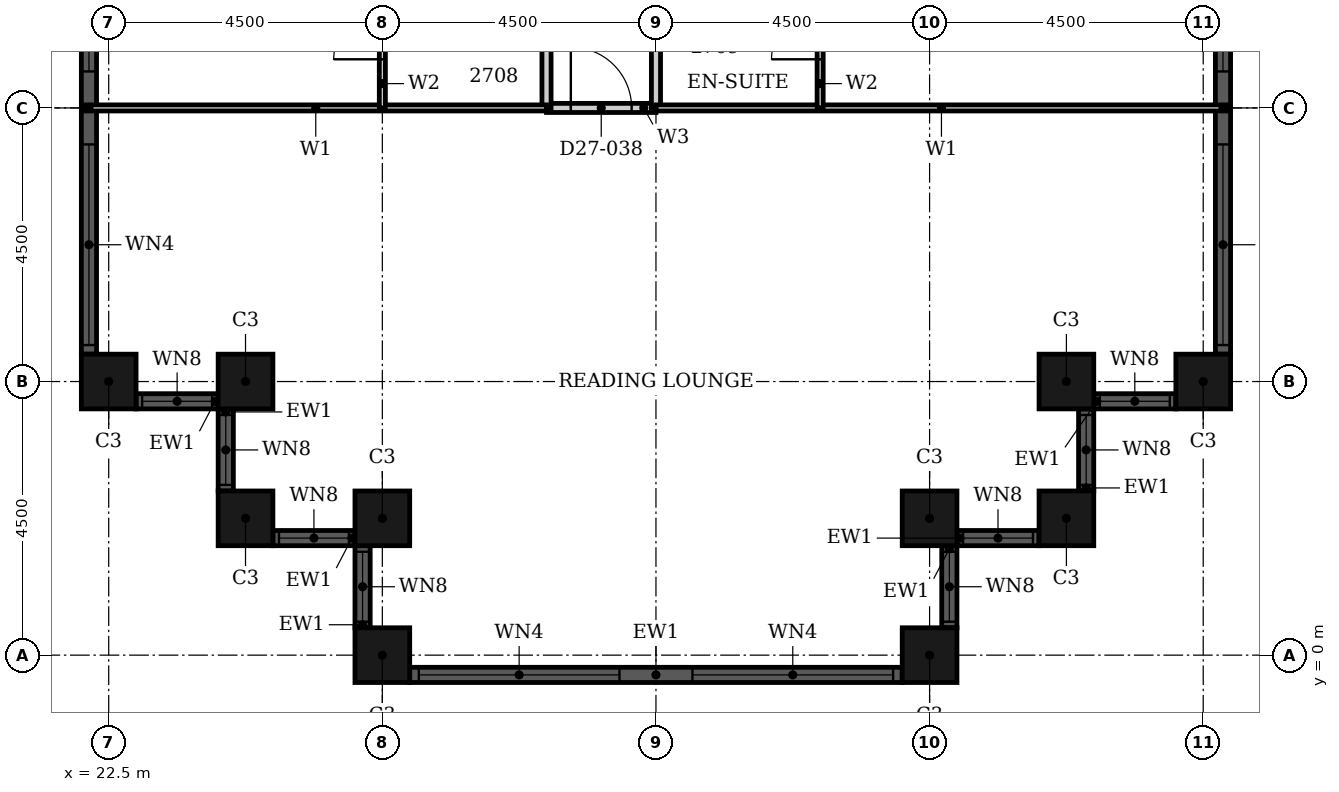
"""IFC4 building model, lengths in metres.
Left out: names, types, materials, properties, quantities, classifications, styles, units other than length and angle.
Written with IfcOpenShell. Run it as: python <this file> out.ifc"""

import sys

from ifc_helpers import new_model, si_unit, direction, frame, frame_2d, origin, origin_2d, place, context, subcontext, project, spatial, rectangle, hollow_rectangle, extrude, element, fill, save


model = new_model("IFC4")
c1 = context("Model", 3, precision=1e-05, world=origin(), true_north=direction((0.0, 1.0)))
c2 = subcontext(c1, "Body", "Model", "MODEL_VIEW")
j1 = project(units=[si_unit("LENGTHUNIT", "METRE"), si_unit("PLANEANGLEUNIT", "RADIAN")], contexts=[c1])
p1 = place(None, origin())
s1 = spatial("IfcSite", under=j1, at=p1, CompositionType="ELEMENT")
p2 = place(p1, origin())
s2 = spatial("IfcBuilding", under=s1, at=p2, CompositionType="ELEMENT")
p3 = place(p2, frame((0.0, 0.0, 111.6)))
s3 = spatial("IfcBuildingStorey", under=s2, at=p3, CompositionType="ELEMENT", Elevation=111.6)
for number, where, z_axis, x_axis in (
    (1, (22.5, 4.5, 0.0), (0.0, 0.0, 1.0), (1.0, 0.0, 0.0)),
    (2, (24.75, 4.5, 0.0), (0.0, 0.0, 1.0), (1.0, 0.0, 0.0)),
    (3, (24.75, 2.25, 0.0), (0.0, 0.0, 1.0), (1.0, 0.0, 0.0)),
    (4, (27.0, 2.25, 0.0), (0.0, 0.0, 1.0), (1.0, 0.0, 0.0)),
    (5, (27.0, 0.0, 0.0), (0.0, 0.0, 1.0), (1.0, 0.0, 0.0)),
    (6, (36.0, 0.0, 0.0), (0.0, 0.0, 1.0), (1.0, 0.0, 0.0)),
    (7, (36.0, 2.25, 0.0), (0.0, 0.0, 1.0), (1.0, 0.0, 0.0)),
    (8, (38.25, 2.25, 0.0), (0.0, 0.0, 1.0), (1.0, 0.0, 0.0)),
    (9, (38.25, 4.5, 0.0), (0.0, 0.0, 1.0), (1.0, 0.0, 0.0)),
    (10, (40.5, 4.5, 0.0), (0.0, 0.0, 1.0), (1.0, 0.0, 0.0)),
):
    element("IfcColumn", number, at=place(p3, frame(where, z_axis=z_axis, x_axis=x_axis)), inside=s3, PredefinedType="COLUMN", context=c2, shape_type="SweptSolid", body=[
        extrude(hollow_rectangle(XDim=0.9, YDim=0.9, WallThickness=0.028, at=origin_2d()), origin(), (0.0, 0.0, 1.0), 3.6),
    ])
p4 = place(p3, frame((22.95, 4.175, 0.0), z_axis=(0.0, 0.0, 1.0), x_axis=(1.0, 0.0, 0.0)))
e11 = element("IfcWall", 11, at=p4, inside=s3, PredefinedType="SOLIDWALL", context=c2, shape_type="SweptSolid", body=[
    extrude(rectangle(XDim=1.35, YDim=0.25, at=frame_2d((0.675, 0.0))), origin(), (0.0, 0.0, 1.0), 3.6),
])
p5 = place(p4, frame((0.1, 0.0, 0.9)))
e12 = element("IfcOpeningElement", 12, at=p5, cuts=e11, PredefinedType="OPENING", context=c2, shape_type="SweptSolid", body=[
    extrude(rectangle(XDim=1.15, YDim=2.08, at=frame_2d((0.575, 1.04))), frame((0.0, 0.135, 0.0), z_axis=(0.0, -1.0, 0.0), x_axis=(1.0, 0.0, 0.0)), (0.0, 0.0, 1.0), 0.27),
])
p6 = place(p3, frame((24.425, 4.05, 0.0), z_axis=(0.0, 0.0, 1.0), x_axis=(0.0, -1.0, 0.0)))
e13 = element("IfcWall", 13, at=p6, inside=s3, PredefinedType="SOLIDWALL", context=c2, shape_type="SweptSolid", body=[
    extrude(rectangle(XDim=1.35, YDim=0.25, at=frame_2d((0.675, 0.0))), origin(), (0.0, 0.0, 1.0), 3.6),
])
p7 = place(p6, frame((0.1, 0.0, 0.9)))
e14 = element("IfcOpeningElement", 14, at=p7, cuts=e13, PredefinedType="OPENING", context=c2, shape_type="SweptSolid", body=[
    extrude(rectangle(XDim=1.15, YDim=2.08, at=frame_2d((0.575, 1.04))), frame((0.0, 0.135, 0.0), z_axis=(0.0, -1.0, 0.0), x_axis=(1.0, 0.0, 0.0)), (0.0, 0.0, 1.0), 0.27),
])
p8 = place(p3, frame((25.2, 1.925, 0.0), z_axis=(0.0, 0.0, 1.0), x_axis=(1.0, 0.0, 0.0)))
e15 = element("IfcWall", 15, at=p8, inside=s3, PredefinedType="SOLIDWALL", context=c2, shape_type="SweptSolid", body=[
    extrude(rectangle(XDim=1.35, YDim=0.25, at=frame_2d((0.675, 0.0))), origin(), (0.0, 0.0, 1.0), 3.6),
])
p9 = place(p8, frame((0.1, 0.0, 0.9)))
e16 = element("IfcOpeningElement", 16, at=p9, cuts=e15, PredefinedType="OPENING", context=c2, shape_type="SweptSolid", body=[
    extrude(rectangle(XDim=1.15, YDim=2.08, at=frame_2d((0.575, 1.04))), frame((0.0, 0.135, 0.0), z_axis=(0.0, -1.0, 0.0), x_axis=(1.0, 0.0, 0.0)), (0.0, 0.0, 1.0), 0.27),
])
p10 = place(p3, frame((26.675, 1.8, 0.0), z_axis=(0.0, 0.0, 1.0), x_axis=(0.0, -1.0, 0.0)))
e17 = element("IfcWall", 17, at=p10, inside=s3, PredefinedType="SOLIDWALL", context=c2, shape_type="SweptSolid", body=[
    extrude(rectangle(XDim=1.35, YDim=0.25, at=frame_2d((0.675, 0.0))), origin(), (0.0, 0.0, 1.0), 3.6),
])
p11 = place(p10, frame((0.1, 0.0, 0.9)))
e18 = element("IfcOpeningElement", 18, at=p11, cuts=e17, PredefinedType="OPENING", context=c2, shape_type="SweptSolid", body=[
    extrude(rectangle(XDim=1.15, YDim=2.08, at=frame_2d((0.575, 1.04))), frame((0.0, 0.135, 0.0), z_axis=(0.0, -1.0, 0.0), x_axis=(1.0, 0.0, 0.0)), (0.0, 0.0, 1.0), 0.27),
])
p12 = place(p3, frame((27.45, -0.325, 0.0), z_axis=(0.0, 0.0, 1.0), x_axis=(1.0, 0.0, 0.0)))
e19 = element("IfcWall", 19, at=p12, inside=s3, PredefinedType="SOLIDWALL", context=c2, shape_type="SweptSolid", body=[
    extrude(rectangle(XDim=8.1, YDim=0.25, at=frame_2d((4.05, 0.0))), origin(), (0.0, 0.0, 1.0), 3.6),
])
p13 = place(p12, frame((0.15, 0.0, 0.9)))
e20 = element("IfcOpeningElement", 20, at=p13, cuts=e19, PredefinedType="OPENING", context=c2, shape_type="SweptSolid", body=[
    extrude(rectangle(XDim=3.3, YDim=2.08, at=frame_2d((1.65, 1.04))), frame((0.0, 0.135, 0.0), z_axis=(0.0, -1.0, 0.0), x_axis=(1.0, 0.0, 0.0)), (0.0, 0.0, 1.0), 0.27),
])
p14 = place(p12, frame((4.65, 0.0, 0.9)))
e21 = element("IfcOpeningElement", 21, at=p14, cuts=e19, PredefinedType="OPENING", context=c2, shape_type="SweptSolid", body=[
    extrude(rectangle(XDim=3.3, YDim=2.08, at=frame_2d((1.65, 1.04))), frame((0.0, 0.135, 0.0), z_axis=(0.0, -1.0, 0.0), x_axis=(1.0, 0.0, 0.0)), (0.0, 0.0, 1.0), 0.27),
])
p15 = place(p3, frame((36.325, 0.45, 0.0), z_axis=(0.0, 0.0, 1.0), x_axis=(0.0, 1.0, 0.0)))
e22 = element("IfcWall", 22, at=p15, inside=s3, PredefinedType="SOLIDWALL", context=c2, shape_type="SweptSolid", body=[
    extrude(rectangle(XDim=1.35, YDim=0.25, at=frame_2d((0.675, 0.0))), origin(), (0.0, 0.0, 1.0), 3.6),
])
p16 = place(p15, frame((0.1, 0.0, 0.9)))
e23 = element("IfcOpeningElement", 23, at=p16, cuts=e22, PredefinedType="OPENING", context=c2, shape_type="SweptSolid", body=[
    extrude(rectangle(XDim=1.15, YDim=2.08, at=frame_2d((0.575, 1.04))), frame((0.0, 0.135, 0.0), z_axis=(0.0, -1.0, 0.0), x_axis=(1.0, 0.0, 0.0)), (0.0, 0.0, 1.0), 0.27),
])
p17 = place(p3, frame((36.45, 1.925, 0.0), z_axis=(0.0, 0.0, 1.0), x_axis=(1.0, 0.0, 0.0)))
e24 = element("IfcWall", 24, at=p17, inside=s3, PredefinedType="SOLIDWALL", context=c2, shape_type="SweptSolid", body=[
    extrude(rectangle(XDim=1.35, YDim=0.25, at=frame_2d((0.675, 0.0))), origin(), (0.0, 0.0, 1.0), 3.6),
])
p18 = place(p17, frame((0.1, 0.0, 0.9)))
e25 = element("IfcOpeningElement", 25, at=p18, cuts=e24, PredefinedType="OPENING", context=c2, shape_type="SweptSolid", body=[
    extrude(rectangle(XDim=1.15, YDim=2.08, at=frame_2d((0.575, 1.04))), frame((0.0, 0.135, 0.0), z_axis=(0.0, -1.0, 0.0), x_axis=(1.0, 0.0, 0.0)), (0.0, 0.0, 1.0), 0.27),
])
p19 = place(p3, frame((38.575, 2.7, 0.0), z_axis=(0.0, 0.0, 1.0), x_axis=(0.0, 1.0, 0.0)))
e26 = element("IfcWall", 26, at=p19, inside=s3, PredefinedType="SOLIDWALL", context=c2, shape_type="SweptSolid", body=[
    extrude(rectangle(XDim=1.35, YDim=0.25, at=frame_2d((0.675, 0.0))), origin(), (0.0, 0.0, 1.0), 3.6),
])
p20 = place(p19, frame((0.1, 0.0, 0.9)))
e27 = element("IfcOpeningElement", 27, at=p20, cuts=e26, PredefinedType="OPENING", context=c2, shape_type="SweptSolid", body=[
    extrude(rectangle(XDim=1.15, YDim=2.08, at=frame_2d((0.575, 1.04))), frame((0.0, 0.135, 0.0), z_axis=(0.0, -1.0, 0.0), x_axis=(1.0, 0.0, 0.0)), (0.0, 0.0, 1.0), 0.27),
])
p21 = place(p3, frame((38.7, 4.175, 0.0), z_axis=(0.0, 0.0, 1.0), x_axis=(1.0, 0.0, 0.0)))
e28 = element("IfcWall", 28, at=p21, inside=s3, PredefinedType="SOLIDWALL", context=c2, shape_type="SweptSolid", body=[
    extrude(rectangle(XDim=1.35, YDim=0.25, at=frame_2d((0.675, 0.0))), origin(), (0.0, 0.0, 1.0), 3.6),
])
p22 = place(p21, frame((0.1, 0.0, 0.9)))
e29 = element("IfcOpeningElement", 29, at=p22, cuts=e28, PredefinedType="OPENING", context=c2, shape_type="SweptSolid", body=[
    extrude(rectangle(XDim=1.15, YDim=2.08, at=frame_2d((0.575, 1.04))), frame((0.0, 0.135, 0.0), z_axis=(0.0, -1.0, 0.0), x_axis=(1.0, 0.0, 0.0)), (0.0, 0.0, 1.0), 0.27),
])
p23 = place(p3, frame((40.825, 4.95, 0.0), z_axis=(0.0, 0.0, 1.0), x_axis=(0.0, 1.0, 0.0)))
e30 = element("IfcWall", 30, at=p23, inside=s3, PredefinedType="SOLIDWALL", context=c2, shape_type="SweptSolid", body=[
    extrude(rectangle(XDim=8.1, YDim=0.25, at=frame_2d((4.05, 0.0))), origin(), (0.0, 0.0, 1.0), 3.6),
])
p24 = place(p23, frame((0.15, 0.0, 0.9)))
e31 = element("IfcOpeningElement", 31, at=p24, cuts=e30, PredefinedType="OPENING", context=c2, shape_type="SweptSolid", body=[
    extrude(rectangle(XDim=3.3, YDim=2.08, at=frame_2d((1.65, 1.04))), frame((0.0, 0.135, 0.0), z_axis=(0.0, -1.0, 0.0), x_axis=(1.0, 0.0, 0.0)), (0.0, 0.0, 1.0), 0.27),
])
p25 = place(p23, frame((4.65, 0.0, 0.9)))
e32 = element("IfcOpeningElement", 32, at=p25, cuts=e30, PredefinedType="OPENING", context=c2, shape_type="SweptSolid", body=[
    extrude(rectangle(XDim=3.3, YDim=2.08, at=frame_2d((1.65, 1.04))), frame((0.0, 0.135, 0.0), z_axis=(0.0, -1.0, 0.0), x_axis=(1.0, 0.0, 0.0)), (0.0, 0.0, 1.0), 0.27),
])
p26 = place(p3, frame((22.175, 13.05, 0.0), z_axis=(0.0, 0.0, 1.0), x_axis=(0.0, -1.0, 0.0)))
e33 = element("IfcWall", 33, at=p26, inside=s3, PredefinedType="SOLIDWALL", context=c2, shape_type="SweptSolid", body=[
    extrude(rectangle(XDim=8.1, YDim=0.25, at=frame_2d((4.05, 0.0))), origin(), (0.0, 0.0, 1.0), 3.6),
])
p27 = place(p26, frame((0.15, 0.0, 0.9)))
e34 = element("IfcOpeningElement", 34, at=p27, cuts=e33, PredefinedType="OPENING", context=c2, shape_type="SweptSolid", body=[
    extrude(rectangle(XDim=3.3, YDim=2.08, at=frame_2d((1.65, 1.04))), frame((0.0, 0.135, 0.0), z_axis=(0.0, -1.0, 0.0), x_axis=(1.0, 0.0, 0.0)), (0.0, 0.0, 1.0), 0.27),
])
p28 = place(p26, frame((4.65, 0.0, 0.9)))
e35 = element("IfcOpeningElement", 35, at=p28, cuts=e33, PredefinedType="OPENING", context=c2, shape_type="SweptSolid", body=[
    extrude(rectangle(XDim=3.3, YDim=2.08, at=frame_2d((1.65, 1.04))), frame((0.0, 0.135, 0.0), z_axis=(0.0, -1.0, 0.0), x_axis=(1.0, 0.0, 0.0)), (0.0, 0.0, 1.0), 0.27),
])
p29 = place(p3, frame((29.7, 9.0, 0.0), z_axis=(0.0, 0.0, 1.0), x_axis=(1.0, 0.0, 0.0)))
e36 = element("IfcWall", 36, at=p29, inside=s3, PredefinedType="PARTITIONING", context=c2, shape_type="SweptSolid", body=[
    extrude(rectangle(XDim=1.8, YDim=0.15, at=frame_2d((0.9, 0.0))), origin(), (0.0, 0.0, 1.0), 3.3),
])
p30 = place(p29, frame((0.4, 0.0, 0.0)))
e37 = element("IfcOpeningElement", 37, at=p30, cuts=e36, PredefinedType="OPENING", context=c2, shape_type="SweptSolid", body=[
    extrude(rectangle(XDim=1.0, YDim=2.1, at=frame_2d((0.5, 1.05))), frame((0.0, 0.085, 0.0), z_axis=(0.0, -1.0, 0.0), x_axis=(1.0, 0.0, 0.0)), (0.0, 0.0, 1.0), 0.17),
])
p31 = place(p3, frame((29.7, 9.0, 0.0), z_axis=(0.0, 0.0, 1.0), x_axis=(0.0, 1.0, 0.0)))
e38 = element("IfcWall", 38, at=p31, inside=s3, PredefinedType="PARTITIONING", context=c2, shape_type="SweptSolid", body=[
    extrude(rectangle(XDim=11.7, YDim=0.15, at=frame_2d((5.85, 0.0))), origin(), (0.0, 0.0, 1.0), 3.3),
])
p32 = place(p31, frame((2.95, 0.0, 0.0)))
e39 = element("IfcOpeningElement", 39, at=p32, cuts=e38, PredefinedType="OPENING", context=c2, shape_type="SweptSolid", body=[
    extrude(rectangle(XDim=1.0, YDim=2.1, at=frame_2d((0.5, 1.05))), frame((0.0, 0.085, 0.0), z_axis=(0.0, -1.0, 0.0), x_axis=(1.0, 0.0, 0.0)), (0.0, 0.0, 1.0), 0.17),
])
p33 = place(p3, frame((31.5, 9.0, 0.0), z_axis=(0.0, 0.0, 1.0), x_axis=(0.0, 1.0, 0.0)))
e40 = element("IfcWall", 40, at=p33, inside=s3, PredefinedType="PARTITIONING", context=c2, shape_type="SweptSolid", body=[
    extrude(rectangle(XDim=11.7, YDim=0.15, at=frame_2d((5.85, 0.0))), origin(), (0.0, 0.0, 1.0), 2.58),
])
p34 = place(p33, frame((2.95, 0.0, 0.0)))
e41 = element("IfcOpeningElement", 41, at=p34, cuts=e40, PredefinedType="OPENING", context=c2, shape_type="SweptSolid", body=[
    extrude(rectangle(XDim=1.0, YDim=2.1, at=frame_2d((0.5, 1.05))), frame((0.0, 0.085, 0.0), z_axis=(0.0, -1.0, 0.0), x_axis=(1.0, 0.0, 0.0)), (0.0, 0.0, 1.0), 0.17),
])
p35 = place(p3, frame((31.5, 9.0, 0.0), z_axis=(0.0, 0.0, 1.0), x_axis=(1.0, 0.0, 0.0)))
e42 = element("IfcWall", 42, at=p35, inside=s3, PredefinedType="PARTITIONING", context=c2, shape_type="SweptSolid", body=[
    extrude(rectangle(XDim=9.39, YDim=0.1, at=frame_2d((4.695, 0.0))), origin(), (0.0, 0.0, 1.0), 3.3),
])
p36 = place(p3, frame((22.11, 9.0, 0.0), z_axis=(0.0, 0.0, 1.0), x_axis=(1.0, 0.0, 0.0)))
e43 = element("IfcWall", 43, at=p36, inside=s3, PredefinedType="PARTITIONING", context=c2, shape_type="SweptSolid", body=[
    extrude(rectangle(XDim=7.59, YDim=0.1, at=frame_2d((3.795, 0.0))), origin(), (0.0, 0.0, 1.0), 3.3),
])
p37 = place(p3, frame((27.0, 9.0, 0.0), z_axis=(0.0, 0.0, 1.0), x_axis=(0.0, 1.0, 0.0)))
e44 = element("IfcWall", 44, at=p37, inside=s3, PredefinedType="PARTITIONING", context=c2, shape_type="SweptSolid", body=[
    extrude(rectangle(XDim=2.4, YDim=0.1, at=frame_2d((1.2, 0.0))), origin(), (0.0, 0.0, 1.0), 2.58),
])
p38 = place(p37, frame((0.8, 0.0, 0.0)))
e45 = element("IfcOpeningElement", 45, at=p38, cuts=e44, PredefinedType="OPENING", context=c2, shape_type="SweptSolid", body=[
    extrude(rectangle(XDim=0.8, YDim=2.1, at=frame_2d((0.4, 1.05))), frame((0.0, 0.06, 0.0), z_axis=(0.0, -1.0, 0.0), x_axis=(1.0, 0.0, 0.0)), (0.0, 0.0, 1.0), 0.12),
])
p39 = place(p3, frame((34.2, 9.0, 0.0), z_axis=(0.0, 0.0, 1.0), x_axis=(0.0, 1.0, 0.0)))
e46 = element("IfcWall", 46, at=p39, inside=s3, PredefinedType="PARTITIONING", context=c2, shape_type="SweptSolid", body=[
    extrude(rectangle(XDim=2.4, YDim=0.1, at=frame_2d((1.2, 0.0))), origin(), (0.0, 0.0, 1.0), 3.3),
])
p40 = place(p39, frame((0.8, 0.0, 0.0)))
e47 = element("IfcOpeningElement", 47, at=p40, cuts=e46, PredefinedType="OPENING", context=c2, shape_type="SweptSolid", body=[
    extrude(rectangle(XDim=0.8, YDim=2.1, at=frame_2d((0.4, 1.05))), frame((0.0, 0.06, 0.0), z_axis=(0.0, -1.0, 0.0), x_axis=(1.0, 0.0, 0.0)), (0.0, 0.0, 1.0), 0.12),
])
p41 = place(p5, origin())
e48 = element("IfcWindow", 48, at=p41, inside=s3, PartitioningType="SINGLE_PANEL", PredefinedType="WINDOW", context=c2, shape_type="SweptSolid", body=[
    extrude(rectangle(XDim=1.15, YDim=2.08, at=frame_2d((0.575, 1.04))), frame((0.0, 0.03, 0.0), z_axis=(0.0, -1.0, 0.0), x_axis=(1.0, 0.0, 0.0)), (0.0, 0.0, 1.0), 0.06),
])
fill(e12, e48)
p42 = place(p7, origin())
e49 = element("IfcWindow", 49, at=p42, inside=s3, PartitioningType="SINGLE_PANEL", PredefinedType="WINDOW", context=c2, shape_type="SweptSolid", body=[
    extrude(rectangle(XDim=1.15, YDim=2.08, at=frame_2d((0.575, 1.04))), frame((0.0, 0.03, 0.0), z_axis=(0.0, -1.0, 0.0), x_axis=(1.0, 0.0, 0.0)), (0.0, 0.0, 1.0), 0.06),
])
fill(e14, e49)
p43 = place(p9, origin())
e50 = element("IfcWindow", 50, at=p43, inside=s3, PartitioningType="SINGLE_PANEL", PredefinedType="WINDOW", context=c2, shape_type="SweptSolid", body=[
    extrude(rectangle(XDim=1.15, YDim=2.08, at=frame_2d((0.575, 1.04))), frame((0.0, 0.03, 0.0), z_axis=(0.0, -1.0, 0.0), x_axis=(1.0, 0.0, 0.0)), (0.0, 0.0, 1.0), 0.06),
])
fill(e16, e50)
p44 = place(p11, origin())
e51 = element("IfcWindow", 51, at=p44, inside=s3, PartitioningType="SINGLE_PANEL", PredefinedType="WINDOW", context=c2, shape_type="SweptSolid", body=[
    extrude(rectangle(XDim=1.15, YDim=2.08, at=frame_2d((0.575, 1.04))), frame((0.0, 0.03, 0.0), z_axis=(0.0, -1.0, 0.0), x_axis=(1.0, 0.0, 0.0)), (0.0, 0.0, 1.0), 0.06),
])
fill(e18, e51)
p45 = place(p13, origin())
e52 = element("IfcWindow", 52, at=p45, inside=s3, PartitioningType="SINGLE_PANEL", PredefinedType="WINDOW", context=c2, shape_type="SweptSolid", body=[
    extrude(rectangle(XDim=3.3, YDim=2.08, at=frame_2d((1.65, 1.04))), frame((0.0, 0.03, 0.0), z_axis=(0.0, -1.0, 0.0), x_axis=(1.0, 0.0, 0.0)), (0.0, 0.0, 1.0), 0.06),
])
fill(e20, e52)
p46 = place(p14, origin())
e53 = element("IfcWindow", 53, at=p46, inside=s3, PartitioningType="SINGLE_PANEL", PredefinedType="WINDOW", context=c2, shape_type="SweptSolid", body=[
    extrude(rectangle(XDim=3.3, YDim=2.08, at=frame_2d((1.65, 1.04))), frame((0.0, 0.03, 0.0), z_axis=(0.0, -1.0, 0.0), x_axis=(1.0, 0.0, 0.0)), (0.0, 0.0, 1.0), 0.06),
])
fill(e21, e53)
p47 = place(p16, origin())
e54 = element("IfcWindow", 54, at=p47, inside=s3, PartitioningType="SINGLE_PANEL", PredefinedType="WINDOW", context=c2, shape_type="SweptSolid", body=[
    extrude(rectangle(XDim=1.15, YDim=2.08, at=frame_2d((0.575, 1.04))), frame((0.0, 0.03, 0.0), z_axis=(0.0, -1.0, 0.0), x_axis=(1.0, 0.0, 0.0)), (0.0, 0.0, 1.0), 0.06),
])
fill(e23, e54)
p48 = place(p18, origin())
e55 = element("IfcWindow", 55, at=p48, inside=s3, PartitioningType="SINGLE_PANEL", PredefinedType="WINDOW", context=c2, shape_type="SweptSolid", body=[
    extrude(rectangle(XDim=1.15, YDim=2.08, at=frame_2d((0.575, 1.04))), frame((0.0, 0.03, 0.0), z_axis=(0.0, -1.0, 0.0), x_axis=(1.0, 0.0, 0.0)), (0.0, 0.0, 1.0), 0.06),
])
fill(e25, e55)
p49 = place(p20, origin())
e56 = element("IfcWindow", 56, at=p49, inside=s3, PartitioningType="SINGLE_PANEL", PredefinedType="WINDOW", context=c2, shape_type="SweptSolid", body=[
    extrude(rectangle(XDim=1.15, YDim=2.08, at=frame_2d((0.575, 1.04))), frame((0.0, 0.03, 0.0), z_axis=(0.0, -1.0, 0.0), x_axis=(1.0, 0.0, 0.0)), (0.0, 0.0, 1.0), 0.06),
])
fill(e27, e56)
p50 = place(p22, origin())
e57 = element("IfcWindow", 57, at=p50, inside=s3, PartitioningType="SINGLE_PANEL", PredefinedType="WINDOW", context=c2, shape_type="SweptSolid", body=[
    extrude(rectangle(XDim=1.15, YDim=2.08, at=frame_2d((0.575, 1.04))), frame((0.0, 0.03, 0.0), z_axis=(0.0, -1.0, 0.0), x_axis=(1.0, 0.0, 0.0)), (0.0, 0.0, 1.0), 0.06),
])
fill(e29, e57)
p51 = place(p24, origin())
e58 = element("IfcWindow", 58, at=p51, inside=s3, PartitioningType="SINGLE_PANEL", PredefinedType="WINDOW", context=c2, shape_type="SweptSolid", body=[
    extrude(rectangle(XDim=3.3, YDim=2.08, at=frame_2d((1.65, 1.04))), frame((0.0, 0.03, 0.0), z_axis=(0.0, -1.0, 0.0), x_axis=(1.0, 0.0, 0.0)), (0.0, 0.0, 1.0), 0.06),
])
fill(e31, e58)
p52 = place(p25, origin())
e59 = element("IfcWindow", 59, at=p52, inside=s3, PartitioningType="SINGLE_PANEL", PredefinedType="WINDOW", context=c2, shape_type="SweptSolid", body=[
    extrude(rectangle(XDim=3.3, YDim=2.08, at=frame_2d((1.65, 1.04))), frame((0.0, 0.03, 0.0), z_axis=(0.0, -1.0, 0.0), x_axis=(1.0, 0.0, 0.0)), (0.0, 0.0, 1.0), 0.06),
])
fill(e32, e59)
p53 = place(p27, origin())
e60 = element("IfcWindow", 60, at=p53, inside=s3, PartitioningType="SINGLE_PANEL", PredefinedType="WINDOW", context=c2, shape_type="SweptSolid", body=[
    extrude(rectangle(XDim=3.3, YDim=2.08, at=frame_2d((1.65, 1.04))), frame((0.0, 0.03, 0.0), z_axis=(0.0, -1.0, 0.0), x_axis=(1.0, 0.0, 0.0)), (0.0, 0.0, 1.0), 0.06),
])
fill(e34, e60)
p54 = place(p28, origin())
e61 = element("IfcWindow", 61, at=p54, inside=s3, PartitioningType="SINGLE_PANEL", PredefinedType="WINDOW", context=c2, shape_type="SweptSolid", body=[
    extrude(rectangle(XDim=3.3, YDim=2.08, at=frame_2d((1.65, 1.04))), frame((0.0, 0.03, 0.0), z_axis=(0.0, -1.0, 0.0), x_axis=(1.0, 0.0, 0.0)), (0.0, 0.0, 1.0), 0.06),
])
fill(e35, e61)
p55 = place(p38, origin())
e62 = element("IfcDoor", 62, at=p55, inside=s3, OperationType="SINGLE_SWING_RIGHT", PredefinedType="DOOR", context=c2, shape_type="SweptSolid", body=[
    extrude(rectangle(XDim=0.8, YDim=2.1, at=frame_2d((0.4, 1.05))), frame((0.0, 0.025, 0.0), z_axis=(0.0, -1.0, 0.0), x_axis=(1.0, 0.0, 0.0)), (0.0, 0.0, 1.0), 0.05),
])
fill(e45, e62)
p56 = place(p40, origin())
e63 = element("IfcDoor", 63, at=p56, inside=s3, OperationType="SINGLE_SWING_RIGHT", PredefinedType="DOOR", context=c2, shape_type="SweptSolid", body=[
    extrude(rectangle(XDim=0.8, YDim=2.1, at=frame_2d((0.4, 1.05))), frame((0.0, 0.025, 0.0), z_axis=(0.0, -1.0, 0.0), x_axis=(1.0, 0.0, 0.0)), (0.0, 0.0, 1.0), 0.05),
])
fill(e47, e63)
p57 = place(p30, origin())
e64 = element("IfcDoor", 64, at=p57, inside=s3, OperationType="SINGLE_SWING_RIGHT", PredefinedType="DOOR", context=c2, shape_type="SweptSolid", body=[
    extrude(rectangle(XDim=1.0, YDim=2.1, at=frame_2d((0.5, 1.05))), frame((0.0, 0.025, 0.0), z_axis=(0.0, -1.0, 0.0), x_axis=(1.0, 0.0, 0.0)), (0.0, 0.0, 1.0), 0.05),
])
fill(e37, e64)
save(model, sys.argv[1])
